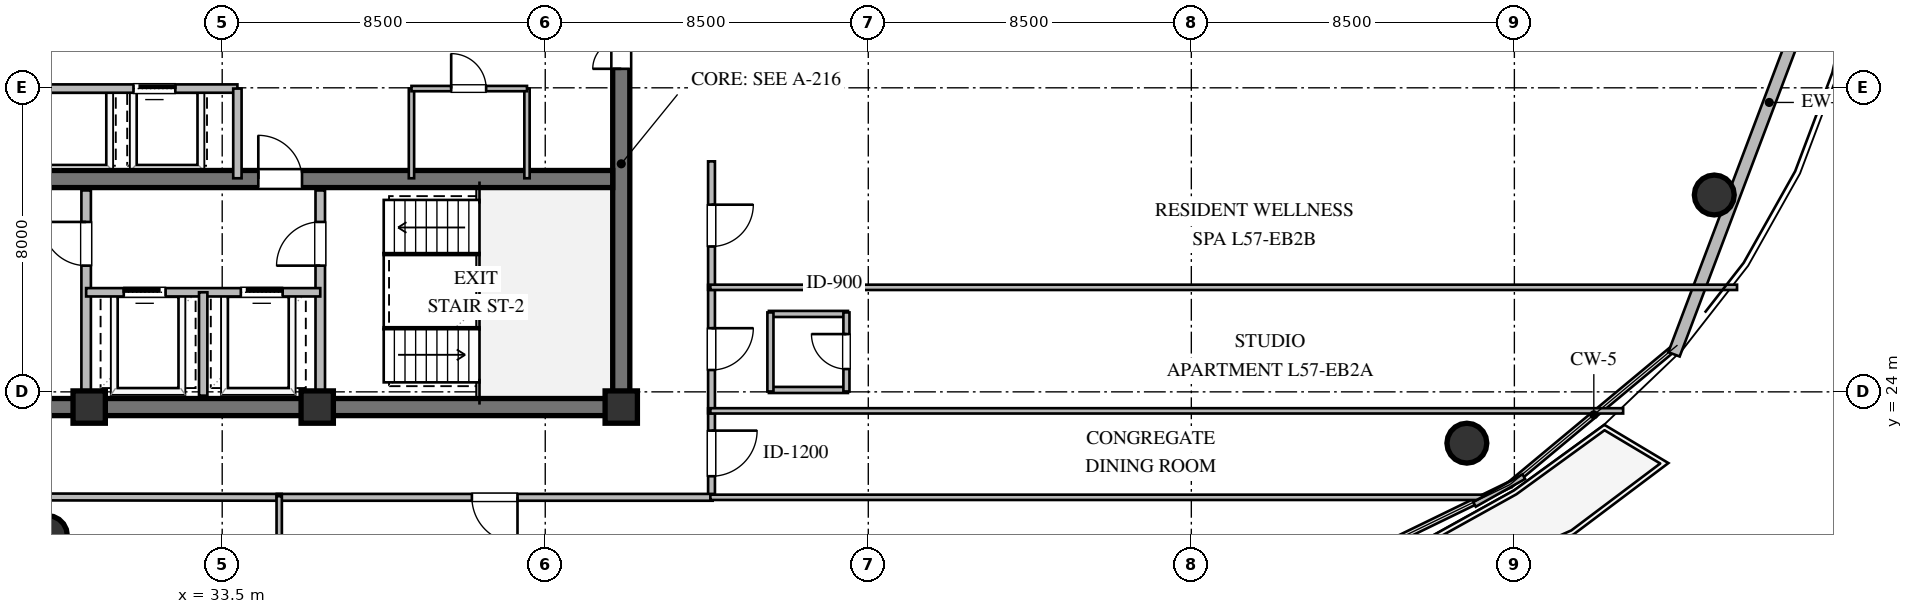
"""IFC4 building model, lengths in metres.
Left out: names, types, materials, properties, quantities, classifications, styles, units other than length and angle.
Written with IfcOpenShell. Run it as: python <this file> out.ifc"""

import sys

from ifc_helpers import new_model, si_unit, direction, frame, frame_2d, origin, origin_2d, place, context, subcontext, project, spatial, rectangle, circle, extrude, element, fill, save


model = new_model("IFC4")
c1 = context("Model", 3, precision=1e-05, world=origin(), true_north=direction((0.0, 1.0)))
c2 = subcontext(c1, "Body", "Model", "MODEL_VIEW")
j1 = project(units=[si_unit("LENGTHUNIT", "METRE"), si_unit("PLANEANGLEUNIT", "RADIAN")], contexts=[c1])
p1 = place(None, origin())
s1 = spatial("IfcSite", under=j1, at=p1, CompositionType="ELEMENT")
p2 = place(p1, origin())
s2 = spatial("IfcBuilding", under=s1, at=p2, CompositionType="ELEMENT")
p3 = place(p2, frame((0.0, 0.0, 217.2)))
s3 = spatial("IfcBuildingStorey", under=s2, at=p3, CompositionType="ELEMENT", Elevation=217.2)
p4 = place(p3, frame((21.775, 23.6, 0.0), z_axis=(0.0, 0.0, 1.0), x_axis=(1.0, 0.0, 0.0)))
e1 = element("IfcWall", 1, at=p4, inside=s3, PredefinedType="SHEAR", context=c2, shape_type="SweptSolid", body=[
    extrude(rectangle(XDim=22.45, YDim=0.45, at=frame_2d((11.225, 0.0))), origin(), (0.0, 0.0, 1.0), 3.36),
])
p5 = place(p3, frame((44.0, 23.825, 0.0), z_axis=(0.0, 0.0, 1.0), x_axis=(0.0, 1.0, 0.0)))
e2 = element("IfcWall", 2, at=p5, inside=s3, PredefinedType="SHEAR", context=c2, shape_type="SweptSolid", body=[
    extrude(rectangle(XDim=12.35, YDim=0.45, at=frame_2d((6.175, 0.0))), origin(), (0.0, 0.0, 1.0), 3.36),
])
p6 = place(p5, frame((8.675, 0.0, 0.0)))
e3 = element("IfcOpeningElement", 3, at=p6, cuts=e2, PredefinedType="OPENING", context=c2, shape_type="SweptSolid", body=[
    extrude(rectangle(XDim=1.5, YDim=2.15, at=frame_2d((0.75, 1.075))), frame((0.0, 0.235, 0.0), z_axis=(0.0, -1.0, 0.0), x_axis=(1.0, 0.0, 0.0)), (0.0, 0.0, 1.0), 0.47),
])
p7 = place(p3, frame((22.225, 29.6, 0.0), z_axis=(0.0, 0.0, 1.0), x_axis=(1.0, 0.0, 0.0)))
e4 = element("IfcWall", 4, at=p7, inside=s3, PredefinedType="SHEAR", context=c2, shape_type="SweptSolid", body=[
    extrude(rectangle(XDim=21.55, YDim=0.45, at=frame_2d((10.775, 0.0))), origin(), (0.0, 0.0, 1.0), 3.36),
])
p8 = place(p7, frame((12.225, 0.0, 0.0)))
e5 = element("IfcOpeningElement", 5, at=p8, cuts=e4, PredefinedType="OPENING", context=c2, shape_type="SweptSolid", body=[
    extrude(rectangle(XDim=1.15, YDim=2.1, at=frame_2d((0.575, 1.05))), frame((0.0, 0.235, 0.0), z_axis=(0.0, -1.0, 0.0), x_axis=(1.0, 0.0, 0.0)), (0.0, 0.0, 1.0), 0.47),
])
for number, where, z_axis, x_axis in (
    (6, (30.0, 23.6, 0.0), (0.0, 0.0, 1.0), (1.0, 0.0, 0.0)),
    (7, (36.0, 23.6, 0.0), (0.0, 0.0, 1.0), (1.0, 0.0, 0.0)),
    (8, (44.0, 23.6, 0.0), (0.0, 0.0, 1.0), (1.0, 0.0, 0.0)),
):
    element("IfcColumn", number, at=place(p3, frame(where, z_axis=z_axis, x_axis=x_axis)), inside=s3, PredefinedType="COLUMN", context=c2, shape_type="SweptSolid", body=[
        extrude(rectangle(XDim=0.85, YDim=0.85, at=origin_2d()), origin(), (0.0, 0.0, 1.0), 3.6),
    ])
for number, where, z_axis, x_axis in (
    (9, (28.9, 20.22, 0.0), (0.0, 0.0, 1.0), (1.0, 0.0, 0.0)),
    (10, (66.25, 22.65, 0.0), (0.0, 0.0, 1.0), (1.0, 0.0, 0.0)),
    (11, (72.76, 29.18, 0.0), (0.0, 0.0, 1.0), (1.0, 0.0, 0.0)),
):
    element("IfcColumn", number, at=place(p3, frame(where, z_axis=z_axis, x_axis=x_axis)), inside=s3, PredefinedType="COLUMN", context=c2, shape_type="SweptSolid", body=[
        extrude(circle(Radius=0.525, at=origin_2d()), origin(), (0.0, 0.0, 1.0), 3.6),
    ])
p9 = place(p3, frame((76.712, 38.243, 0.0), z_axis=(0.0, 0.0, 1.0), x_axis=(-0.353659523244, -0.935374225441, 0.0)))
e12 = element("IfcWall", 12, at=p9, inside=s3, PredefinedType="STANDARD", context=c2, shape_type="SweptSolid", body=[
    extrude(rectangle(XDim=14.172, YDim=0.32, at=frame_2d((7.086, 0.0))), origin(), (0.0, 0.0, 1.0), 3.36),
])
p10 = place(p3, frame((29.92, 23.9, 0.0), z_axis=(0.0, 0.0, 1.0), x_axis=(0.0, 1.0, 0.0)))
e13 = element("IfcWall", 13, at=p10, inside=s3, PredefinedType="SOLIDWALL", context=c2, shape_type="SweptSolid", body=[
    extrude(rectangle(XDim=5.4, YDim=0.25, at=frame_2d((2.7, 0.0))), origin(), (0.0, 0.0, 1.0), 3.36),
])
p11 = place(p10, frame((3.421, 0.0, 0.0)))
e14 = element("IfcOpeningElement", 14, at=p11, cuts=e13, PredefinedType="OPENING", context=c2, shape_type="SweptSolid", body=[
    extrude(rectangle(XDim=1.15, YDim=2.1, at=frame_2d((0.575, 1.05))), frame((0.0, 0.135, 0.0), z_axis=(0.0, -1.0, 0.0), x_axis=(1.0, 0.0, 0.0)), (0.0, 0.0, 1.0), 0.27),
])
p12 = place(p3, frame((36.08, 23.9, 0.0), z_axis=(0.0, 0.0, 1.0), x_axis=(0.0, 1.0, 0.0)))
e15 = element("IfcWall", 15, at=p12, inside=s3, PredefinedType="SOLIDWALL", context=c2, shape_type="SweptSolid", body=[
    extrude(rectangle(XDim=5.4, YDim=0.25, at=frame_2d((2.7, 0.0))), origin(), (0.0, 0.0, 1.0), 3.36),
])
p13 = place(p12, frame((3.421, 0.0, 0.0)))
e16 = element("IfcOpeningElement", 16, at=p13, cuts=e15, PredefinedType="OPENING", context=c2, shape_type="SweptSolid", body=[
    extrude(rectangle(XDim=1.15, YDim=2.1, at=frame_2d((0.575, 1.05))), frame((0.0, 0.135, 0.0), z_axis=(0.0, -1.0, 0.0), x_axis=(1.0, 0.0, 0.0)), (0.0, 0.0, 1.0), 0.27),
])
p14 = place(p3, frame((29.92, 26.62, 0.0), z_axis=(0.0, 0.0, 1.0), x_axis=(1.0, 0.0, 0.0)))
e17 = element("IfcWall", 17, at=p14, inside=s3, PredefinedType="SOLIDWALL", context=c2, shape_type="SweptSolid", body=[
    extrude(rectangle(XDim=6.16, YDim=0.22, at=frame_2d((3.08, 0.0))), origin(), (0.0, 0.0, 1.0), 3.36),
])
p15 = place(p14, frame((0.99, 0.0, 0.0)))
e18 = element("IfcOpeningElement", 18, at=p15, cuts=e17, PredefinedType="OPENING", context=c2, shape_type="SweptSolid", body=[
    extrude(rectangle(XDim=1.1, YDim=2.1, at=frame_2d((0.55, 1.05))), frame((0.0, 0.12, 0.0), z_axis=(0.0, -1.0, 0.0), x_axis=(1.0, 0.0, 0.0)), (0.0, 0.0, 1.0), 0.24),
])
p16 = place(p14, frame((4.07, 0.0, 0.0)))
e19 = element("IfcOpeningElement", 19, at=p16, cuts=e17, PredefinedType="OPENING", context=c2, shape_type="SweptSolid", body=[
    extrude(rectangle(XDim=1.1, YDim=2.1, at=frame_2d((0.55, 1.05))), frame((0.0, 0.12, 0.0), z_axis=(0.0, -1.0, 0.0), x_axis=(1.0, 0.0, 0.0)), (0.0, 0.0, 1.0), 0.24),
])
p17 = place(p3, frame((33.0, 23.9, 0.0), z_axis=(0.0, 0.0, 1.0), x_axis=(0.0, 1.0, 0.0)))
e20 = element("IfcWall", 20, at=p17, inside=s3, PredefinedType="SOLIDWALL", context=c2, shape_type="SweptSolid", body=[
    extrude(rectangle(XDim=2.72, YDim=0.22, at=frame_2d((1.36, 0.0))), origin(), (0.0, 0.0, 1.0), 3.36),
])
p18 = place(p3, frame((26.1, 31.98, 0.0), z_axis=(0.0, 0.0, 1.0), x_axis=(1.0, 0.0, 0.0)))
e21 = element("IfcWall", 21, at=p18, inside=s3, PredefinedType="SOLIDWALL", context=c2, shape_type="SweptSolid", body=[
    extrude(rectangle(XDim=7.8, YDim=0.22, at=frame_2d((3.9, 0.0))), origin(), (0.0, 0.0, 1.0), 3.36),
])
p19 = place(p18, frame((1.4, 0.0, 0.0)))
e22 = element("IfcOpeningElement", 22, at=p19, cuts=e21, PredefinedType="OPENING", context=c2, shape_type="SweptSolid", body=[
    extrude(rectangle(XDim=1.1, YDim=2.1, at=frame_2d((0.55, 1.05))), frame((0.0, 0.12, 0.0), z_axis=(0.0, -1.0, 0.0), x_axis=(1.0, 0.0, 0.0)), (0.0, 0.0, 1.0), 0.24),
])
p20 = place(p18, frame((5.066, 0.0, 0.0)))
e23 = element("IfcOpeningElement", 23, at=p20, cuts=e21, PredefinedType="OPENING", context=c2, shape_type="SweptSolid", body=[
    extrude(rectangle(XDim=1.1, YDim=2.1, at=frame_2d((0.55, 1.05))), frame((0.0, 0.12, 0.0), z_axis=(0.0, -1.0, 0.0), x_axis=(1.0, 0.0, 0.0)), (0.0, 0.0, 1.0), 0.24),
])
p21 = place(p3, frame((33.9, 29.62, 0.0), z_axis=(0.0, 0.0, 1.0), x_axis=(0.0, 1.0, 0.0)))
e24 = element("IfcWall", 24, at=p21, inside=s3, PredefinedType="SOLIDWALL", context=c2, shape_type="SweptSolid", body=[
    extrude(rectangle(XDim=2.36, YDim=0.22, at=frame_2d((1.18, 0.0))), origin(), (0.0, 0.0, 1.0), 3.36),
])
for number, where, z_axis, x_axis in (
    (25, (38.48, 29.62, 0.0), (0.0, 0.0, 1.0), (0.0, 1.0, 0.0)),
    (26, (41.52, 29.62, 0.0), (0.0, 0.0, 1.0), (0.0, 1.0, 0.0)),
):
    element("IfcWall", number, at=place(p3, frame(where, z_axis=z_axis, x_axis=x_axis)), inside=s3, PredefinedType="PARTITIONING", context=c2, shape_type="SweptSolid", body=[
        extrude(rectangle(XDim=2.36, YDim=0.14, at=frame_2d((1.18, 0.0))), origin(), (0.0, 0.0, 1.0), 3.36),
    ])
p22 = place(p3, frame((38.48, 31.98, 0.0), z_axis=(0.0, 0.0, 1.0), x_axis=(1.0, 0.0, 0.0)))
e27 = element("IfcWall", 27, at=p22, inside=s3, PredefinedType="PARTITIONING", context=c2, shape_type="SweptSolid", body=[
    extrude(rectangle(XDim=3.04, YDim=0.14, at=frame_2d((1.52, 0.0))), origin(), (0.0, 0.0, 1.0), 3.36),
])
p23 = place(p22, frame((1.045, 0.0, 0.0)))
e28 = element("IfcOpeningElement", 28, at=p23, cuts=e27, PredefinedType="OPENING", context=c2, shape_type="SweptSolid", body=[
    extrude(rectangle(XDim=0.92, YDim=2.1, at=frame_2d((0.46, 1.05))), frame((0.0, 0.08, 0.0), z_axis=(0.0, -1.0, 0.0), x_axis=(1.0, 0.0, 0.0)), (0.0, 0.0, 1.0), 0.16),
])
p24 = place(p3, frame((47.885, 24.05, 0.0), z_axis=(0.0, 0.0, 1.0), x_axis=(1.0, 0.0, 0.0)))
e29 = element("IfcWall", 29, at=p24, inside=s3, PredefinedType="PLUMBINGWALL", context=c2, shape_type="SweptSolid", body=[
    extrude(rectangle(XDim=2.08, YDim=0.16, at=frame_2d((1.04, 0.0))), origin(), (0.0, 0.0, 1.0), 2.89),
])
for number, where, z_axis, x_axis in (
    (30, (47.885, 26.05, 0.0), (0.0, 0.0, 1.0), (1.0, 0.0, 0.0)),
    (31, (47.925, 24.01, 0.0), (0.0, 0.0, 1.0), (0.0, 1.0, 0.0)),
):
    element("IfcWall", number, at=place(p3, frame(where, z_axis=z_axis, x_axis=x_axis)), inside=s3, PredefinedType="PLUMBINGWALL", context=c2, shape_type="SweptSolid", body=[
        extrude(rectangle(XDim=2.08, YDim=0.16, at=frame_2d((1.04, 0.0))), origin(), (0.0, 0.0, 1.0), 3.36),
    ])
p25 = place(p3, frame((49.925, 24.01, 0.0), z_axis=(0.0, 0.0, 1.0), x_axis=(0.0, 1.0, 0.0)))
e32 = element("IfcWall", 32, at=p25, inside=s3, PredefinedType="PLUMBINGWALL", context=c2, shape_type="SweptSolid", body=[
    extrude(rectangle(XDim=2.08, YDim=0.16, at=frame_2d((1.04, 0.0))), origin(), (0.0, 0.0, 1.0), 3.36),
])
p26 = place(p25, frame((0.59, 0.0, 0.0)))
e33 = element("IfcOpeningElement", 33, at=p26, cuts=e32, PredefinedType="OPENING", context=c2, shape_type="SweptSolid", body=[
    extrude(rectangle(XDim=0.92, YDim=2.1, at=frame_2d((0.46, 1.05))), frame((0.0, 0.09, 0.0), z_axis=(0.0, -1.0, 0.0), x_axis=(1.0, 0.0, 0.0)), (0.0, 0.0, 1.0), 0.18),
])
p27 = place(p3, frame((46.375, 23.565, 0.0), z_axis=(0.0, 0.0, 1.0), x_axis=(0.0, -1.0, 0.0)))
e34 = element("IfcWall", 34, at=p27, inside=s3, PredefinedType="PARTITIONING", context=c2, shape_type="SweptSolid", body=[
    extrude(rectangle(XDim=2.37, YDim=0.18, at=frame_2d((1.185, 0.0))), origin(), (0.0, 0.0, 1.0), 3.36),
])
p28 = place(p27, frame((0.585, 0.0, 0.0)))
e35 = element("IfcOpeningElement", 35, at=p28, cuts=e34, PredefinedType="OPENING", context=c2, shape_type="SweptSolid", body=[
    extrude(rectangle(XDim=1.2, YDim=2.15, at=frame_2d((0.6, 1.075))), frame((0.0, 0.1, 0.0), z_axis=(0.0, -1.0, 0.0), x_axis=(1.0, 0.0, 0.0)), (0.0, 0.0, 1.0), 0.2),
])
p29 = place(p3, frame((46.375, 26.815, 0.0), z_axis=(0.0, 0.0, 1.0), x_axis=(0.0, -1.0, 0.0)))
e36 = element("IfcWall", 36, at=p29, inside=s3, PredefinedType="PARTITIONING", context=c2, shape_type="SweptSolid", body=[
    extrude(rectangle(XDim=3.38, YDim=0.18, at=frame_2d((1.69, 0.0))), origin(), (0.0, 0.0, 1.0), 3.36),
])
p30 = place(p29, frame((1.14, 0.0, 0.0)))
e37 = element("IfcOpeningElement", 37, at=p30, cuts=e36, PredefinedType="OPENING", context=c2, shape_type="SweptSolid", body=[
    extrude(rectangle(XDim=1.1, YDim=2.1, at=frame_2d((0.55, 1.05))), frame((0.0, 0.1, 0.0), z_axis=(0.0, -1.0, 0.0), x_axis=(1.0, 0.0, 0.0)), (0.0, 0.0, 1.0), 0.2),
])
p31 = place(p3, frame((46.375, 30.065, 0.0), z_axis=(0.0, 0.0, 1.0), x_axis=(0.0, -1.0, 0.0)))
e38 = element("IfcWall", 38, at=p31, inside=s3, PredefinedType="PARTITIONING", context=c2, shape_type="SweptSolid", body=[
    extrude(rectangle(XDim=3.38, YDim=0.18, at=frame_2d((1.69, 0.0))), origin(), (0.0, 0.0, 1.0), 3.36),
])
p32 = place(p31, frame((1.14, 0.0, 0.0)))
e39 = element("IfcOpeningElement", 39, at=p32, cuts=e38, PredefinedType="OPENING", context=c2, shape_type="SweptSolid", body=[
    extrude(rectangle(XDim=1.1, YDim=2.1, at=frame_2d((0.55, 1.05))), frame((0.0, 0.1, 0.0), z_axis=(0.0, -1.0, 0.0), x_axis=(1.0, 0.0, 0.0)), (0.0, 0.0, 1.0), 0.2),
])
p33 = place(p3, frame((35.065, 21.225, 0.0), z_axis=(0.0, 0.0, 1.0), x_axis=(-0.999998948453, 0.001450204611, 0.0)))
e40 = element("IfcWall", 40, at=p33, inside=s3, PredefinedType="PARTITIONING", context=c2, shape_type="SweptSolid", body=[
    extrude(rectangle(XDim=11.784, YDim=0.18, at=frame_2d((5.892, 0.0))), origin(), (0.0, 0.0, 1.0), 2.89),
])
p34 = place(p33, frame((7.779, 0.0, 0.0)))
e41 = element("IfcOpeningElement", 41, at=p34, cuts=e40, PredefinedType="OPENING", context=c2, shape_type="SweptSolid", body=[
    extrude(rectangle(XDim=1.1, YDim=2.1, at=frame_2d((0.55, 1.05))), frame((0.0, 0.1, 0.0), z_axis=(0.0, -1.0, 0.0), x_axis=(1.0, 0.0, 0.0)), (0.0, 0.0, 1.0), 0.2),
])
p35 = place(p3, frame((46.405, 21.225, 0.0), z_axis=(0.0, 0.0, 1.0), x_axis=(-1.0, 0.0, 0.0)))
e42 = element("IfcWall", 42, at=p35, inside=s3, PredefinedType="PARTITIONING", context=c2, shape_type="SweptSolid", body=[
    extrude(rectangle(XDim=11.47, YDim=0.18, at=frame_2d((5.735, 0.0))), origin(), (0.0, 0.0, 1.0), 2.996),
])
p36 = place(p35, frame((5.135, 0.0, 0.0)))
e43 = element("IfcOpeningElement", 43, at=p36, cuts=e42, PredefinedType="OPENING", context=c2, shape_type="SweptSolid", body=[
    extrude(rectangle(XDim=1.2, YDim=2.15, at=frame_2d((0.6, 1.075))), frame((0.0, 0.1, 0.0), z_axis=(0.0, -1.0, 0.0), x_axis=(1.0, 0.0, 0.0)), (0.0, 0.0, 1.0), 0.2),
])
p37 = place(p3, frame((46.345, 23.5, 0.0), z_axis=(0.0, 0.0, 1.0), x_axis=(1.0, 0.0, 0.0)))
e44 = element("IfcWall", 44, at=p37, inside=s3, PredefinedType="PARTITIONING", context=c2, shape_type="SweptSolid", body=[
    extrude(rectangle(XDim=24.017, YDim=0.14, at=frame_2d((12.009, 0.0))), origin(), (0.0, 0.0, 1.0), 2.89),
])
p38 = place(p3, frame((66.684, 21.225, 0.0), z_axis=(0.0, 0.0, 1.0), x_axis=(-1.0, 0.0, 0.0)))
e45 = element("IfcWall", 45, at=p38, inside=s3, PredefinedType="PARTITIONING", context=c2, shape_type="SweptSolid", body=[
    extrude(rectangle(XDim=20.339, YDim=0.14, at=frame_2d((10.169, 0.0))), origin(), (0.0, 0.0, 1.0), 2.996),
])
p39 = place(p3, frame((67.748, 21.77, 0.0), z_axis=(0.0, 0.0, 1.0), x_axis=(-0.871352238731, -0.490658003153, 0.0)))
e46 = element("IfcWall", 46, at=p39, inside=s3, PredefinedType="PARTITIONING", context=c2, shape_type="SweptSolid", body=[
    extrude(rectangle(XDim=1.49, YDim=0.14, at=frame_2d((0.745, 0.0))), origin(), (0.0, 0.0, 1.0), 3.36),
])
p40 = place(p3, frame((46.345, 26.75, 0.0), z_axis=(0.0, 0.0, 1.0), x_axis=(1.0, 0.0, 0.0)))
e47 = element("IfcWall", 47, at=p40, inside=s3, PredefinedType="PARTITIONING", context=c2, shape_type="SweptSolid", body=[
    extrude(rectangle(XDim=27.014, YDim=0.14, at=frame_2d((13.507, 0.0))), origin(), (0.0, 0.0, 1.0), 2.89),
])
p41 = place(p3, frame((35.0, 21.255, 0.0), z_axis=(0.0, 0.0, 1.0), x_axis=(0.0, -1.0, 0.0)))
e48 = element("IfcWall", 48, at=p41, inside=s3, PredefinedType="PARTITIONING", context=c2, shape_type="SweptSolid", body=[
    extrude(rectangle(XDim=4.169, YDim=0.14, at=frame_2d((2.085, 0.0))), origin(), (0.0, 0.0, 1.0), 3.36),
])
p42 = place(p11, origin())
e49 = element("IfcDoor", 49, at=p42, inside=s3, OperationType="SINGLE_SWING_RIGHT", PredefinedType="DOOR", context=c2, shape_type="SweptSolid", body=[
    extrude(rectangle(XDim=1.15, YDim=2.1, at=frame_2d((0.575, 1.05))), frame((0.0, 0.025, 0.0), z_axis=(0.0, -1.0, 0.0), x_axis=(1.0, 0.0, 0.0)), (0.0, 0.0, 1.0), 0.05),
])
fill(e14, e49)
p43 = place(p13, origin())
e50 = element("IfcDoor", 50, at=p43, inside=s3, OperationType="SINGLE_SWING_LEFT", PredefinedType="DOOR", context=c2, shape_type="SweptSolid", body=[
    extrude(rectangle(XDim=1.15, YDim=2.1, at=frame_2d((0.575, 1.05))), frame((0.0, 0.025, 0.0), z_axis=(0.0, -1.0, 0.0), x_axis=(1.0, 0.0, 0.0)), (0.0, 0.0, 1.0), 0.05),
])
fill(e16, e50)
p44 = place(p15, origin())
e51 = element("IfcDoor", 51, at=p44, inside=s3, OperationType="SLIDING_TO_LEFT", PredefinedType="DOOR", context=c2, shape_type="SweptSolid", body=[
    extrude(rectangle(XDim=1.1, YDim=2.1, at=frame_2d((0.55, 1.05))), frame((0.0, 0.025, 0.0), z_axis=(0.0, -1.0, 0.0), x_axis=(1.0, 0.0, 0.0)), (0.0, 0.0, 1.0), 0.05),
])
fill(e18, e51)
p45 = place(p16, origin())
e52 = element("IfcDoor", 52, at=p45, inside=s3, OperationType="SLIDING_TO_RIGHT", PredefinedType="DOOR", context=c2, shape_type="SweptSolid", body=[
    extrude(rectangle(XDim=1.1, YDim=2.1, at=frame_2d((0.55, 1.05))), frame((0.0, 0.025, 0.0), z_axis=(0.0, -1.0, 0.0), x_axis=(1.0, 0.0, 0.0)), (0.0, 0.0, 1.0), 0.05),
])
fill(e19, e52)
p46 = place(p8, origin())
e53 = element("IfcDoor", 53, at=p46, inside=s3, OperationType="SINGLE_SWING_LEFT", PredefinedType="DOOR", context=c2, shape_type="SweptSolid", body=[
    extrude(rectangle(XDim=1.15, YDim=2.1, at=frame_2d((0.575, 1.05))), frame((0.0, 0.025, 0.0), z_axis=(0.0, -1.0, 0.0), x_axis=(1.0, 0.0, 0.0)), (0.0, 0.0, 1.0), 0.05),
])
fill(e5, e53)
p47 = place(p6, origin())
e54 = element("IfcDoor", 54, at=p47, inside=s3, OperationType="DOUBLE_DOOR_SINGLE_SWING", PredefinedType="DOOR", context=c2, shape_type="SweptSolid", body=[
    extrude(rectangle(XDim=1.5, YDim=2.15, at=frame_2d((0.75, 1.075))), frame((0.0, 0.025, 0.0), z_axis=(0.0, -1.0, 0.0), x_axis=(1.0, 0.0, 0.0)), (0.0, 0.0, 1.0), 0.05),
])
fill(e3, e54)
p48 = place(p20, origin())
e55 = element("IfcDoor", 55, at=p48, inside=s3, OperationType="SLIDING_TO_RIGHT", PredefinedType="DOOR", context=c2, shape_type="SweptSolid", body=[
    extrude(rectangle(XDim=1.1, YDim=2.1, at=frame_2d((0.55, 1.05))), frame((0.0, 0.025, 0.0), z_axis=(0.0, -1.0, 0.0), x_axis=(1.0, 0.0, 0.0)), (0.0, 0.0, 1.0), 0.05),
])
fill(e23, e55)
p49 = place(p23, origin())
e56 = element("IfcDoor", 56, at=p49, inside=s3, OperationType="SINGLE_SWING_LEFT", PredefinedType="DOOR", context=c2, shape_type="SweptSolid", body=[
    extrude(rectangle(XDim=0.92, YDim=2.1, at=frame_2d((0.46, 1.05))), frame((0.0, 0.025, 0.0), z_axis=(0.0, -1.0, 0.0), x_axis=(1.0, 0.0, 0.0)), (0.0, 0.0, 1.0), 0.05),
])
fill(e28, e56)
p50 = place(p26, origin())
e57 = element("IfcDoor", 57, at=p50, inside=s3, OperationType="SINGLE_SWING_RIGHT", PredefinedType="DOOR", context=c2, shape_type="SweptSolid", body=[
    extrude(rectangle(XDim=0.92, YDim=2.1, at=frame_2d((0.46, 1.05))), frame((0.0, 0.025, 0.0), z_axis=(0.0, -1.0, 0.0), x_axis=(1.0, 0.0, 0.0)), (0.0, 0.0, 1.0), 0.05),
])
fill(e33, e57)
p51 = place(p28, origin())
e58 = element("IfcDoor", 58, at=p51, inside=s3, OperationType="SINGLE_SWING_LEFT", PredefinedType="DOOR", context=c2, shape_type="SweptSolid", body=[
    extrude(rectangle(XDim=1.2, YDim=2.15, at=frame_2d((0.6, 1.075))), frame((0.0, 0.025, 0.0), z_axis=(0.0, -1.0, 0.0), x_axis=(1.0, 0.0, 0.0)), (0.0, 0.0, 1.0), 0.05),
])
fill(e35, e58)
p52 = place(p30, origin())
e59 = element("IfcDoor", 59, at=p52, inside=s3, OperationType="SINGLE_SWING_LEFT", PredefinedType="DOOR", context=c2, shape_type="SweptSolid", body=[
    extrude(rectangle(XDim=1.1, YDim=2.1, at=frame_2d((0.55, 1.05))), frame((0.0, 0.025, 0.0), z_axis=(0.0, -1.0, 0.0), x_axis=(1.0, 0.0, 0.0)), (0.0, 0.0, 1.0), 0.05),
])
fill(e37, e59)
p53 = place(p32, origin())
e60 = element("IfcDoor", 60, at=p53, inside=s3, OperationType="SINGLE_SWING_LEFT", PredefinedType="DOOR", context=c2, shape_type="SweptSolid", body=[
    extrude(rectangle(XDim=1.1, YDim=2.1, at=frame_2d((0.55, 1.05))), frame((0.0, 0.025, 0.0), z_axis=(0.0, -1.0, 0.0), x_axis=(1.0, 0.0, 0.0)), (0.0, 0.0, 1.0), 0.05),
])
fill(e39, e60)
p54 = place(p36, origin())
e61 = element("IfcDoor", 61, at=p54, inside=s3, OperationType="SINGLE_SWING_LEFT", PredefinedType="DOOR", context=c2, shape_type="SweptSolid", body=[
    extrude(rectangle(XDim=1.2, YDim=2.15, at=frame_2d((0.6, 1.075))), frame((0.0, 0.025, 0.0), z_axis=(0.0, -1.0, 0.0), x_axis=(1.0, 0.0, 0.0)), (0.0, 0.0, 1.0), 0.05),
])
fill(e43, e61)
save(model, sys.argv[1])
